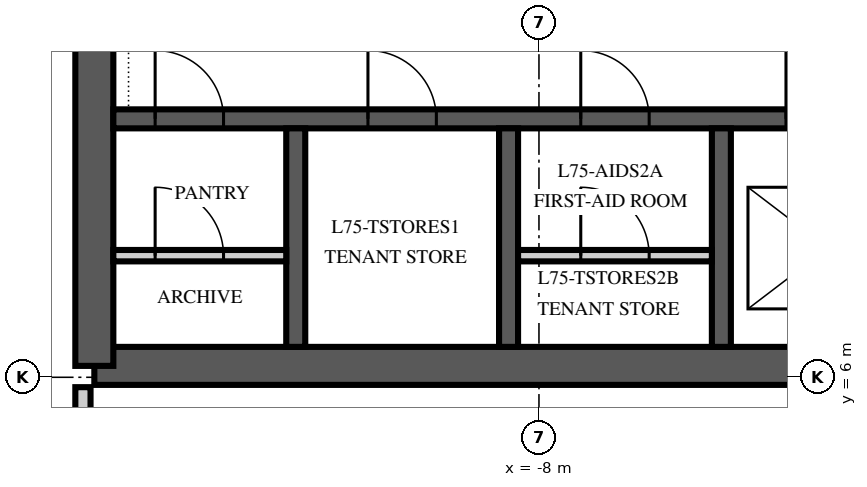
"""IFC4 building model, lengths in metres.
Left out: names, types, materials, properties, quantities, classifications, styles, units other than length and angle.
Written with IfcOpenShell. Run it as: python <this file> out.ifc"""

import sys

from ifc_helpers import new_model, si_unit, direction, frame, frame_2d, origin, place, context, subcontext, project, spatial, polyline, rectangle, outline, extrude, element, fill, save


model = new_model("IFC4")
c1 = context("Model", 3, precision=1e-05, world=origin(), true_north=direction((0.0, 1.0)))
c2 = subcontext(c1, "Body", "Model", "MODEL_VIEW")
j1 = project(units=[si_unit("LENGTHUNIT", "METRE"), si_unit("PLANEANGLEUNIT", "RADIAN")], contexts=[c1])
p1 = place(None, origin())
s1 = spatial("IfcSite", under=j1, at=p1, CompositionType="ELEMENT")
p2 = place(p1, origin())
s2 = spatial("IfcBuilding", under=s1, at=p2, CompositionType="ELEMENT")
p3 = place(p2, frame((0.0, 0.0, 320.0)))
s3 = spatial("IfcBuildingStorey", under=s2, at=p3, CompositionType="ELEMENT", Elevation=320.0)
p4 = place(p3, frame((-13.85, 6.15, 0.0), z_axis=(0.0, 0.0, 1.0), x_axis=(1.0, 0.0, 0.0)))
e1 = element("IfcWall", 1, at=p4, inside=s3, PredefinedType="SHEAR", context=c2, shape_type="SweptSolid", body=[
    extrude(rectangle(XDim=27.7, YDim=0.5, at=frame_2d((13.85, 0.0))), origin(), (0.0, 0.0, 1.0), 4.0),
])
p5 = place(p3, frame((-13.85, 23.85, 0.0), z_axis=(0.0, 0.0, 1.0), x_axis=(0.0, -1.0, 0.0)))
e2 = element("IfcWall", 2, at=p5, inside=s3, PredefinedType="SHEAR", context=c2, shape_type="SweptSolid", body=[
    extrude(outline(polyline([(0.0, -0.25), (17.7, -0.25), (17.7, 0.0), (17.45, 0.0), (17.45, 0.25), (0.25, 0.25), (0.25, 0.0), (0.0, 0.0), (0.0, -0.25)])), origin(), (0.0, 0.0, 1.0), 4.0),
])
p6 = place(p5, frame((11.75, 0.0, 0.0)))
e3 = element("IfcOpeningElement", 3, at=p6, cuts=e2, PredefinedType="OPENING", context=c2, shape_type="SweptSolid", body=[
    extrude(rectangle(XDim=1.8, YDim=2.4, at=frame_2d((0.9, 1.2))), frame((0.0, 0.265, 0.0), z_axis=(0.0, -1.0, 0.0), x_axis=(1.0, 0.0, 0.0)), (0.0, 0.0, 1.0), 0.53),
])
p7 = place(p3, frame((-13.6, 9.4, 0.0), z_axis=(0.0, 0.0, 1.0), x_axis=(1.0, 0.0, 0.0)))
e4 = element("IfcWall", 4, at=p7, inside=s3, PredefinedType="SHEAR", context=c2, shape_type="SweptSolid", body=[
    extrude(rectangle(XDim=27.2, YDim=0.25, at=frame_2d((13.6, 0.0))), origin(), (0.0, 0.0, 1.0), 4.0),
])
p8 = place(p7, frame((8.85, 0.0, 0.0)))
e5 = element("IfcOpeningElement", 5, at=p8, cuts=e4, PredefinedType="OPENING", context=c2, shape_type="SweptSolid", body=[
    extrude(rectangle(XDim=1.1, YDim=2.1, at=frame_2d((0.55, 1.05))), frame((0.0, 0.14, 0.0), z_axis=(0.0, -1.0, 0.0), x_axis=(1.0, 0.0, 0.0)), (0.0, 0.0, 1.0), 0.28),
])
p9 = place(p7, frame((11.65, 0.0, 0.0)))
e6 = element("IfcOpeningElement", 6, at=p9, cuts=e4, PredefinedType="OPENING", context=c2, shape_type="SweptSolid", body=[
    extrude(rectangle(XDim=1.1, YDim=2.1, at=frame_2d((0.55, 1.05))), frame((0.0, 0.14, 0.0), z_axis=(0.0, -1.0, 0.0), x_axis=(1.0, 0.0, 0.0)), (0.0, 0.0, 1.0), 0.28),
])
p10 = place(p7, frame((14.45, 0.0, 0.0)))
e7 = element("IfcOpeningElement", 7, at=p10, cuts=e4, PredefinedType="OPENING", context=c2, shape_type="SweptSolid", body=[
    extrude(rectangle(XDim=1.1, YDim=2.1, at=frame_2d((0.55, 1.05))), frame((0.0, 0.14, 0.0), z_axis=(0.0, -1.0, 0.0), x_axis=(1.0, 0.0, 0.0)), (0.0, 0.0, 1.0), 0.28),
])
p11 = place(p7, frame((0.55, 0.0, 0.0)))
e8 = element("IfcOpeningElement", 8, at=p11, cuts=e4, PredefinedType="OPENING", context=c2, shape_type="SweptSolid", body=[
    extrude(rectangle(XDim=0.9, YDim=2.1, at=frame_2d((0.45, 1.05))), frame((0.0, 0.14, 0.0), z_axis=(0.0, -1.0, 0.0), x_axis=(1.0, 0.0, 0.0)), (0.0, 0.0, 1.0), 0.28),
])
p12 = place(p7, frame((3.35, 0.0, 0.0)))
e9 = element("IfcOpeningElement", 9, at=p12, cuts=e4, PredefinedType="OPENING", context=c2, shape_type="SweptSolid", body=[
    extrude(rectangle(XDim=0.9, YDim=2.1, at=frame_2d((0.45, 1.05))), frame((0.0, 0.14, 0.0), z_axis=(0.0, -1.0, 0.0), x_axis=(1.0, 0.0, 0.0)), (0.0, 0.0, 1.0), 0.28),
])
p13 = place(p7, frame((6.15, 0.0, 0.0)))
e10 = element("IfcOpeningElement", 10, at=p13, cuts=e4, PredefinedType="OPENING", context=c2, shape_type="SweptSolid", body=[
    extrude(rectangle(XDim=0.9, YDim=2.1, at=frame_2d((0.45, 1.05))), frame((0.0, 0.14, 0.0), z_axis=(0.0, -1.0, 0.0), x_axis=(1.0, 0.0, 0.0)), (0.0, 0.0, 1.0), 0.28),
])
p14 = place(p7, frame((17.35, 0.0, 0.0)))
e11 = element("IfcOpeningElement", 11, at=p14, cuts=e4, PredefinedType="OPENING", context=c2, shape_type="SweptSolid", body=[
    extrude(rectangle(XDim=0.9, YDim=2.1, at=frame_2d((0.45, 1.05))), frame((0.0, 0.14, 0.0), z_axis=(0.0, -1.0, 0.0), x_axis=(1.0, 0.0, 0.0)), (0.0, 0.0, 1.0), 0.28),
])
p15 = place(p7, frame((20.15, 0.0, 0.0)))
e12 = element("IfcOpeningElement", 12, at=p15, cuts=e4, PredefinedType="OPENING", context=c2, shape_type="SweptSolid", body=[
    extrude(rectangle(XDim=0.9, YDim=2.1, at=frame_2d((0.45, 1.05))), frame((0.0, 0.14, 0.0), z_axis=(0.0, -1.0, 0.0), x_axis=(1.0, 0.0, 0.0)), (0.0, 0.0, 1.0), 0.28),
])
p16 = place(p7, frame((22.95, 0.0, 0.0)))
e13 = element("IfcOpeningElement", 13, at=p16, cuts=e4, PredefinedType="OPENING", context=c2, shape_type="SweptSolid", body=[
    extrude(rectangle(XDim=0.9, YDim=2.1, at=frame_2d((0.45, 1.05))), frame((0.0, 0.14, 0.0), z_axis=(0.0, -1.0, 0.0), x_axis=(1.0, 0.0, 0.0)), (0.0, 0.0, 1.0), 0.28),
])
for number, where, z_axis, x_axis in (
    (14, (-11.2, 6.4, 0.0), (0.0, 0.0, 1.0), (0.0, 1.0, 0.0)),
    (15, (-8.4, 6.4, 0.0), (0.0, 0.0, 1.0), (0.0, 1.0, 0.0)),
    (16, (-5.6, 6.4, 0.0), (0.0, 0.0, 1.0), (0.0, 1.0, 0.0)),
):
    element("IfcWall", number, at=place(p3, frame(where, z_axis=z_axis, x_axis=x_axis)), inside=s3, PredefinedType="SHEAR", context=c2, shape_type="SweptSolid", body=[
        extrude(rectangle(XDim=2.875, YDim=0.25, at=frame_2d((1.438, 0.0))), origin(), (0.0, 0.0, 1.0), 4.0),
    ])
p17 = place(p3, frame((-13.6, 7.6, 0.0), z_axis=(0.0, 0.0, 1.0), x_axis=(1.0, 0.0, 0.0)))
e17 = element("IfcWall", 17, at=p17, inside=s3, PredefinedType="PARTITIONING", context=c2, shape_type="SweptSolid", body=[
    extrude(rectangle(XDim=2.275, YDim=0.15, at=frame_2d((1.138, 0.0))), origin(), (0.0, 0.0, 1.0), 3.85),
])
p18 = place(p17, frame((0.55, 0.0, 0.0)))
e18 = element("IfcOpeningElement", 18, at=p18, cuts=e17, PredefinedType="OPENING", context=c2, shape_type="SweptSolid", body=[
    extrude(rectangle(XDim=0.9, YDim=2.1, at=frame_2d((0.45, 1.05))), frame((0.0, 0.09, 0.0), z_axis=(0.0, -1.0, 0.0), x_axis=(1.0, 0.0, 0.0)), (0.0, 0.0, 1.0), 0.18),
])
p19 = place(p3, frame((-8.275, 7.6, 0.0), z_axis=(0.0, 0.0, 1.0), x_axis=(1.0, 0.0, 0.0)))
e19 = element("IfcWall", 19, at=p19, inside=s3, PredefinedType="PARTITIONING", context=c2, shape_type="SweptSolid", body=[
    extrude(rectangle(XDim=2.55, YDim=0.15, at=frame_2d((1.275, 0.0))), origin(), (0.0, 0.0, 1.0), 3.85),
])
p20 = place(p19, frame((0.825, 0.0, 0.0)))
e20 = element("IfcOpeningElement", 20, at=p20, cuts=e19, PredefinedType="OPENING", context=c2, shape_type="SweptSolid", body=[
    extrude(rectangle(XDim=0.9, YDim=2.1, at=frame_2d((0.45, 1.05))), frame((0.0, 0.09, 0.0), z_axis=(0.0, -1.0, 0.0), x_axis=(1.0, 0.0, 0.0)), (0.0, 0.0, 1.0), 0.18),
])
p21 = place(p3, frame((-14.0, 3.675, 0.0), z_axis=(0.0, 0.0, 1.0), x_axis=(0.0, 1.0, 0.0)))
e21 = element("IfcWall", 21, at=p21, inside=s3, PredefinedType="PARTITIONING", context=c2, shape_type="SweptSolid", body=[
    extrude(rectangle(XDim=2.195, YDim=0.2, at=frame_2d((1.098, 0.0))), origin(), (0.0, 0.0, 1.0), 3.13),
])
p22 = place(p8, origin())
e22 = element("IfcDoor", 22, at=p22, inside=s3, OperationType="SLIDING_TO_LEFT", PredefinedType="DOOR", context=c2, shape_type="SweptSolid", body=[
    extrude(rectangle(XDim=1.1, YDim=2.1, at=frame_2d((0.55, 1.05))), frame((0.0, 0.125, 0.0), z_axis=(0.0, -1.0, 0.0), x_axis=(1.0, 0.0, 0.0)), (0.0, 0.0, 1.0), 0.25),
])
fill(e5, e22)
p23 = place(p11, origin())
e23 = element("IfcDoor", 23, at=p23, inside=s3, OperationType="SINGLE_SWING_LEFT", PredefinedType="DOOR", context=c2, shape_type="SweptSolid", body=[
    extrude(rectangle(XDim=0.9, YDim=2.1, at=frame_2d((0.45, 1.05))), frame((0.0, 0.125, 0.0), z_axis=(0.0, -1.0, 0.0), x_axis=(1.0, 0.0, 0.0)), (0.0, 0.0, 1.0), 0.25),
])
fill(e8, e23)
p24 = place(p18, origin())
e24 = element("IfcDoor", 24, at=p24, inside=s3, OperationType="SINGLE_SWING_LEFT", PredefinedType="DOOR", context=c2, shape_type="SweptSolid", body=[
    extrude(rectangle(XDim=0.9, YDim=2.1, at=frame_2d((0.45, 1.05))), frame((0.0, 0.075, 0.0), z_axis=(0.0, -1.0, 0.0), x_axis=(1.0, 0.0, 0.0)), (0.0, 0.0, 1.0), 0.149),
])
fill(e18, e24)
p25 = place(p12, origin())
e25 = element("IfcDoor", 25, at=p25, inside=s3, OperationType="SINGLE_SWING_LEFT", PredefinedType="DOOR", context=c2, shape_type="SweptSolid", body=[
    extrude(rectangle(XDim=0.9, YDim=2.1, at=frame_2d((0.45, 1.05))), frame((0.0, 0.125, 0.0), z_axis=(0.0, -1.0, 0.0), x_axis=(1.0, 0.0, 0.0)), (0.0, 0.0, 1.0), 0.25),
])
fill(e9, e25)
p26 = place(p13, origin())
e26 = element("IfcDoor", 26, at=p26, inside=s3, OperationType="SINGLE_SWING_LEFT", PredefinedType="DOOR", context=c2, shape_type="SweptSolid", body=[
    extrude(rectangle(XDim=0.9, YDim=2.1, at=frame_2d((0.45, 1.05))), frame((0.0, 0.125, 0.0), z_axis=(0.0, -1.0, 0.0), x_axis=(1.0, 0.0, 0.0)), (0.0, 0.0, 1.0), 0.25),
])
fill(e10, e26)
p27 = place(p20, origin())
e27 = element("IfcDoor", 27, at=p27, inside=s3, OperationType="SINGLE_SWING_LEFT", PredefinedType="DOOR", context=c2, shape_type="SweptSolid", body=[
    extrude(rectangle(XDim=0.9, YDim=2.1, at=frame_2d((0.45, 1.05))), frame((0.0, 0.075, 0.0), z_axis=(0.0, -1.0, 0.0), x_axis=(1.0, 0.0, 0.0)), (0.0, 0.0, 1.0), 0.149),
])
fill(e20, e27)
save(model, sys.argv[1])
